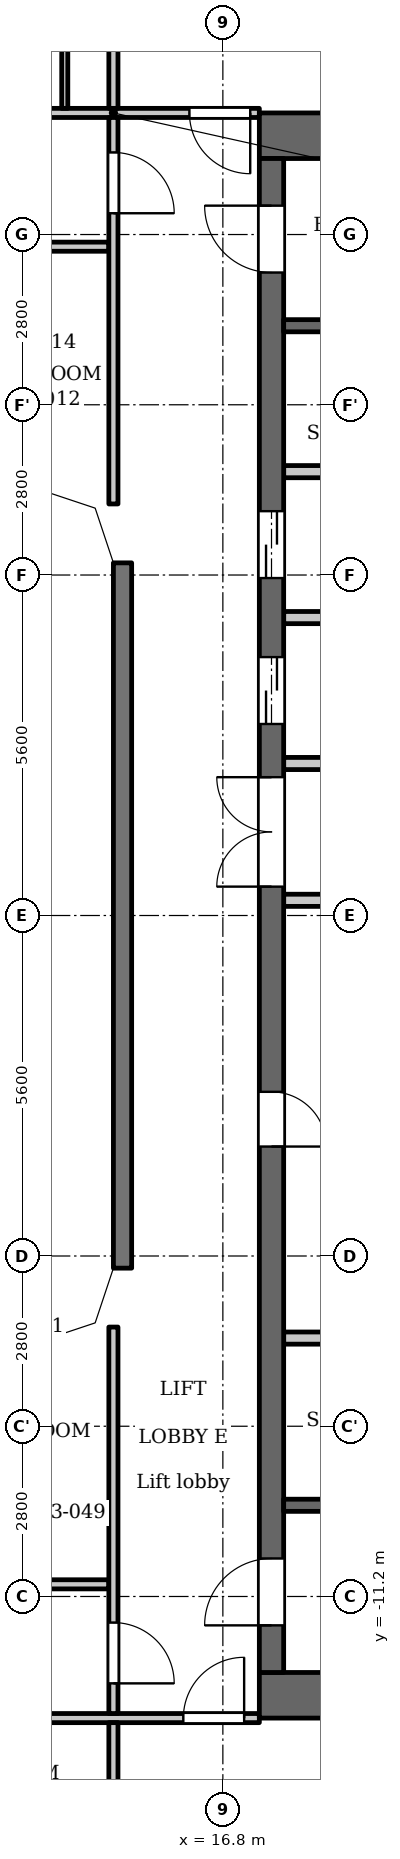
"""IFC4 building model, lengths in metres.
Left out: names, types, materials, properties, quantities, classifications, styles, units other than length and angle.
Written with IfcOpenShell. Run it as: python <this file> out.ifc"""

import sys

from ifc_helpers import new_model, si_unit, direction, frame, frame_2d, origin, place, context, subcontext, project, spatial, polyline, rectangle, outline, extrude, element, fill, save


model = new_model("IFC4")
c1 = context("Model", 3, precision=1e-05, world=origin(), true_north=direction((0.0, 1.0)))
c2 = subcontext(c1, "Body", "Model", "MODEL_VIEW")
j1 = project(units=[si_unit("LENGTHUNIT", "METRE"), si_unit("PLANEANGLEUNIT", "RADIAN")], contexts=[c1])
p1 = place(None, origin())
s1 = spatial("IfcSite", under=j1, at=p1, CompositionType="ELEMENT")
p2 = place(p1, origin())
s2 = spatial("IfcBuilding", under=s1, at=p2, CompositionType="ELEMENT")
p3 = place(p2, frame((0.0, 0.0, 167.6)))
s3 = spatial("IfcBuildingStorey", under=s2, at=p3, CompositionType="ELEMENT", Elevation=167.6)
p4 = place(p3, frame((15.15, 5.8, 0.0), z_axis=(0.0, 0.0, 1.0), x_axis=(0.0, -1.0, 0.0)))
e1 = element("IfcWall", 1, at=p4, inside=s3, PredefinedType="SOLIDWALL", context=c2, shape_type="SweptSolid", body=[
    extrude(rectangle(XDim=11.6, YDim=0.3, at=frame_2d((5.8, 0.0))), origin(), (0.0, 0.0, 1.0), 3.2),
])
for number, where, z_axis, x_axis in (
    (2, (17.4, 12.825, 0.0), (0.0, 0.0, 1.0), (1.0, 0.0, 0.0)),
    (3, (17.4, -12.825, 0.0), (0.0, 0.0, 1.0), (1.0, 0.0, 0.0)),
):
    element("IfcWall", number, at=place(p3, frame(where, z_axis=z_axis, x_axis=x_axis)), inside=s3, PredefinedType="SHEAR", context=c2, shape_type="SweptSolid", body=[
        extrude(rectangle(XDim=10.4, YDim=0.75, at=frame_2d((5.2, 0.0))), origin(), (0.0, 0.0, 1.0), 3.2),
    ])
p5 = place(p3, frame((17.6, -12.45, 0.0), z_axis=(0.0, 0.0, 1.0), x_axis=(0.0, 1.0, 0.0)))
e4 = element("IfcWall", 4, at=p5, inside=s3, PredefinedType="SHEAR", context=c2, shape_type="SweptSolid", body=[
    extrude(rectangle(XDim=24.9, YDim=0.4, at=frame_2d((12.45, 0.0))), origin(), (0.0, 0.0, 1.0), 3.2),
])
p6 = place(p5, frame((8.65, 0.0, 0.0)))
e5 = element("IfcOpeningElement", 5, at=p6, cuts=e4, PredefinedType="OPENING", context=c2, shape_type="SweptSolid", body=[
    extrude(rectangle(XDim=0.9, YDim=2.1, at=frame_2d((0.45, 1.05))), frame((0.0, 0.21, 0.0), z_axis=(0.0, -1.0, 0.0), x_axis=(1.0, 0.0, 0.0)), (0.0, 0.0, 1.0), 0.42),
])
p7 = place(p5, frame((15.6, 0.0, 0.0)))
e6 = element("IfcOpeningElement", 6, at=p7, cuts=e4, PredefinedType="OPENING", context=c2, shape_type="SweptSolid", body=[
    extrude(rectangle(XDim=1.1, YDim=2.1, at=frame_2d((0.55, 1.05))), frame((0.0, 0.21, 0.0), z_axis=(0.0, -1.0, 0.0), x_axis=(1.0, 0.0, 0.0)), (0.0, 0.0, 1.0), 0.42),
])
p8 = place(p5, frame((18.0, 0.0, 0.0)))
e7 = element("IfcOpeningElement", 7, at=p8, cuts=e4, PredefinedType="OPENING", context=c2, shape_type="SweptSolid", body=[
    extrude(rectangle(XDim=1.1, YDim=2.1, at=frame_2d((0.55, 1.05))), frame((0.0, 0.21, 0.0), z_axis=(0.0, -1.0, 0.0), x_axis=(1.0, 0.0, 0.0)), (0.0, 0.0, 1.0), 0.42),
])
p9 = place(p5, frame((23.025, 0.0, 0.0)))
e8 = element("IfcOpeningElement", 8, at=p9, cuts=e4, PredefinedType="OPENING", context=c2, shape_type="SweptSolid", body=[
    extrude(rectangle(XDim=1.1, YDim=2.1, at=frame_2d((0.55, 1.05))), frame((0.0, 0.21, 0.0), z_axis=(0.0, -1.0, 0.0), x_axis=(1.0, 0.0, 0.0)), (0.0, 0.0, 1.0), 0.42),
])
p10 = place(p5, frame((0.775, 0.0, 0.0)))
e9 = element("IfcOpeningElement", 9, at=p10, cuts=e4, PredefinedType="OPENING", context=c2, shape_type="SweptSolid", body=[
    extrude(rectangle(XDim=1.1, YDim=2.1, at=frame_2d((0.55, 1.05))), frame((0.0, 0.21, 0.0), z_axis=(0.0, -1.0, 0.0), x_axis=(1.0, 0.0, 0.0)), (0.0, 0.0, 1.0), 0.42),
])
p11 = place(p5, frame((12.925, 0.0, 0.0)))
e10 = element("IfcOpeningElement", 10, at=p11, cuts=e4, PredefinedType="OPENING", context=c2, shape_type="SweptSolid", body=[
    extrude(rectangle(XDim=1.8, YDim=2.1, at=frame_2d((0.9, 1.05))), frame((0.0, 0.21, 0.0), z_axis=(0.0, -1.0, 0.0), x_axis=(1.0, 0.0, 0.0)), (0.0, 0.0, 1.0), 0.42),
])
p12 = place(p3, frame((17.8, -9.7, 0.0), z_axis=(0.0, 0.0, 1.0), x_axis=(1.0, 0.0, 0.0)))
e11 = element("IfcWall", 11, at=p12, inside=s3, PredefinedType="SHEAR", context=c2, shape_type="SweptSolid", body=[
    extrude(rectangle(XDim=8.45, YDim=0.2, at=frame_2d((4.225, 0.0))), origin(), (0.0, 0.0, 1.0), 3.2),
])
p13 = place(p12, frame((0.85, 0.0, 0.0)))
e12 = element("IfcOpeningElement", 12, at=p13, cuts=e11, PredefinedType="OPENING", context=c2, shape_type="SweptSolid", body=[
    extrude(rectangle(XDim=1.1, YDim=2.1, at=frame_2d((0.55, 1.05))), frame((0.0, 0.11, 0.0), z_axis=(0.0, -1.0, 0.0), x_axis=(1.0, 0.0, 0.0)), (0.0, 0.0, 1.0), 0.22),
])
p14 = place(p12, frame((3.75, 0.0, 0.0)))
e13 = element("IfcOpeningElement", 13, at=p14, cuts=e11, PredefinedType="OPENING", context=c2, shape_type="SweptSolid", body=[
    extrude(rectangle(XDim=1.1, YDim=2.1, at=frame_2d((0.55, 1.05))), frame((0.0, 0.11, 0.0), z_axis=(0.0, -1.0, 0.0), x_axis=(1.0, 0.0, 0.0)), (0.0, 0.0, 1.0), 0.22),
])
p15 = place(p3, frame((17.8, -6.95, 0.0), z_axis=(0.0, 0.0, 1.0), x_axis=(1.0, 0.0, 0.0)))
e14 = element("IfcWall", 14, at=p15, inside=s3, PredefinedType="PARTITIONING", context=c2, shape_type="SweptSolid", body=[
    extrude(rectangle(XDim=2.8, YDim=0.2, at=frame_2d((1.4, 0.0))), origin(), (0.0, 0.0, 1.0), 3.2),
])
p16 = place(p3, frame((17.8, 0.25, 0.0), z_axis=(0.0, 0.0, 1.0), x_axis=(1.0, 0.0, 0.0)))
e15 = element("IfcWall", 15, at=p16, inside=s3, PredefinedType="PARTITIONING", context=c2, shape_type="SweptSolid", body=[
    extrude(rectangle(XDim=3.0, YDim=0.2, at=frame_2d((1.5, 0.0))), origin(), (0.0, 0.0, 1.0), 3.2),
])
p17 = place(p16, frame((1.98, 0.0, 0.0)))
e16 = element("IfcOpeningElement", 16, at=p17, cuts=e15, PredefinedType="OPENING", context=c2, shape_type="SweptSolid", body=[
    extrude(rectangle(XDim=0.9, YDim=2.1, at=frame_2d((0.45, 1.05))), frame((0.0, 0.11, 0.0), z_axis=(0.0, -1.0, 0.0), x_axis=(1.0, 0.0, 0.0)), (0.0, 0.0, 1.0), 0.22),
])
p18 = place(p3, frame((17.8, 2.5, 0.0), z_axis=(0.0, 0.0, 1.0), x_axis=(1.0, 0.0, 0.0)))
e17 = element("IfcWall", 17, at=p18, inside=s3, PredefinedType="PARTITIONING", context=c2, shape_type="SweptSolid", body=[
    extrude(rectangle(XDim=3.0, YDim=0.2, at=frame_2d((1.5, 0.0))), origin(), (0.0, 0.0, 1.0), 3.2),
])
for number, where, z_axis, x_axis in (
    (18, (17.8, 4.9, 0.0), (0.0, 0.0, 1.0), (1.0, 0.0, 0.0)),
    (19, (17.8, 7.3, 0.0), (0.0, 0.0, 1.0), (1.0, 0.0, 0.0)),
):
    element("IfcWall", number, at=place(p3, frame(where, z_axis=z_axis, x_axis=x_axis)), inside=s3, PredefinedType="PARTITIONING", context=c2, shape_type="SweptSolid", body=[
        extrude(rectangle(XDim=2.8, YDim=0.2, at=frame_2d((1.4, 0.0))), origin(), (0.0, 0.0, 1.0), 3.2),
    ])
p19 = place(p3, frame((17.8, 9.7, 0.0), z_axis=(0.0, 0.0, 1.0), x_axis=(1.0, 0.0, 0.0)))
e20 = element("IfcWall", 20, at=p19, inside=s3, PredefinedType="SHEAR", context=c2, shape_type="SweptSolid", body=[
    extrude(rectangle(XDim=8.45, YDim=0.2, at=frame_2d((4.225, 0.0))), origin(), (0.0, 0.0, 1.0), 3.2),
])
p20 = place(p19, frame((0.85, 0.0, 0.0)))
e21 = element("IfcOpeningElement", 21, at=p20, cuts=e20, PredefinedType="OPENING", context=c2, shape_type="SweptSolid", body=[
    extrude(rectangle(XDim=1.1, YDim=2.1, at=frame_2d((0.55, 1.05))), frame((0.0, 0.11, 0.0), z_axis=(0.0, -1.0, 0.0), x_axis=(1.0, 0.0, 0.0)), (0.0, 0.0, 1.0), 0.22),
])
p21 = place(p19, frame((3.75, 0.0, 0.0)))
e22 = element("IfcOpeningElement", 22, at=p21, cuts=e20, PredefinedType="OPENING", context=c2, shape_type="SweptSolid", body=[
    extrude(rectangle(XDim=1.1, YDim=2.1, at=frame_2d((0.55, 1.05))), frame((0.0, 0.11, 0.0), z_axis=(0.0, -1.0, 0.0), x_axis=(1.0, 0.0, 0.0)), (0.0, 0.0, 1.0), 0.22),
])
p22 = place(p3, frame((-17.4, -13.2, 0.0), z_axis=(0.0, 0.0, 1.0), x_axis=(1.0, 0.0, 0.0)))
e23 = element("IfcWall", 23, at=p22, inside=s3, PredefinedType="PARTITIONING", context=c2, shape_type="SweptSolid", body=[
    extrude(rectangle(XDim=34.8, YDim=0.15, at=frame_2d((17.4, 0.0))), origin(), (0.0, 0.0, 1.0), 3.2),
])
p23 = place(p22, frame((0.15, 0.0, 0.0)))
e24 = element("IfcOpeningElement", 24, at=p23, cuts=e23, PredefinedType="OPENING", context=c2, shape_type="SweptSolid", body=[
    extrude(rectangle(XDim=1.0, YDim=2.1, at=frame_2d((0.5, 1.05))), frame((0.0, 0.085, 0.0), z_axis=(0.0, -1.0, 0.0), x_axis=(1.0, 0.0, 0.0)), (0.0, 0.0, 1.0), 0.17),
])
p24 = place(p22, frame((33.55, 0.0, 0.0)))
e25 = element("IfcOpeningElement", 25, at=p24, cuts=e23, PredefinedType="OPENING", context=c2, shape_type="SweptSolid", body=[
    extrude(rectangle(XDim=1.0, YDim=2.1, at=frame_2d((0.5, 1.05))), frame((0.0, 0.085, 0.0), z_axis=(0.0, -1.0, 0.0), x_axis=(1.0, 0.0, 0.0)), (0.0, 0.0, 1.0), 0.17),
])
p25 = place(p22, frame((15.7, 0.0, 0.0)))
e26 = element("IfcOpeningElement", 26, at=p25, cuts=e23, PredefinedType="OPENING", context=c2, shape_type="SweptSolid", body=[
    extrude(rectangle(XDim=1.0, YDim=2.1, at=frame_2d((0.5, 1.05))), frame((0.0, 0.085, 0.0), z_axis=(0.0, -1.0, 0.0), x_axis=(1.0, 0.0, 0.0)), (0.0, 0.0, 1.0), 0.17),
])
p26 = place(p22, frame((26.9, 0.0, 0.0)))
e27 = element("IfcOpeningElement", 27, at=p26, cuts=e23, PredefinedType="OPENING", context=c2, shape_type="SweptSolid", body=[
    extrude(rectangle(XDim=1.0, YDim=2.1, at=frame_2d((0.5, 1.05))), frame((0.0, 0.085, 0.0), z_axis=(0.0, -1.0, 0.0), x_axis=(1.0, 0.0, 0.0)), (0.0, 0.0, 1.0), 0.17),
])
p27 = place(p3, frame((-14.925, -11.0, 0.0), z_axis=(0.0, 0.0, 1.0), x_axis=(1.0, 0.0, 0.0)))
e28 = element("IfcWall", 28, at=p27, inside=s3, PredefinedType="PARTITIONING", context=c2, shape_type="SweptSolid", body=[
    extrude(rectangle(XDim=29.85, YDim=0.15, at=frame_2d((14.925, 0.0))), origin(), (0.0, 0.0, 1.0), 3.2),
])
p28 = place(p27, frame((9.875, 0.0, 0.0)))
e29 = element("IfcOpeningElement", 29, at=p28, cuts=e28, PredefinedType="OPENING", context=c2, shape_type="SweptSolid", body=[
    extrude(rectangle(XDim=1.0, YDim=2.1, at=frame_2d((0.5, 1.05))), frame((0.0, 0.085, 0.0), z_axis=(0.0, -1.0, 0.0), x_axis=(1.0, 0.0, 0.0)), (0.0, 0.0, 1.0), 0.17),
])
p29 = place(p27, frame((17.875, 0.0, 0.0)))
e30 = element("IfcOpeningElement", 30, at=p29, cuts=e28, PredefinedType="OPENING", context=c2, shape_type="SweptSolid", body=[
    extrude(rectangle(XDim=1.0, YDim=2.1, at=frame_2d((0.5, 1.05))), frame((0.0, 0.085, 0.0), z_axis=(0.0, -1.0, 0.0), x_axis=(1.0, 0.0, 0.0)), (0.0, 0.0, 1.0), 0.17),
])
p30 = place(p3, frame((-14.925, 11.0, 0.0), z_axis=(0.0, 0.0, 1.0), x_axis=(1.0, 0.0, 0.0)))
e31 = element("IfcWall", 31, at=p30, inside=s3, PredefinedType="PARTITIONING", context=c2, shape_type="SweptSolid", body=[
    extrude(rectangle(XDim=29.85, YDim=0.15, at=frame_2d((14.925, 0.0))), origin(), (0.0, 0.0, 1.0), 3.2),
])
p31 = place(p30, frame((2.475, 0.0, 0.0)))
e32 = element("IfcOpeningElement", 32, at=p31, cuts=e31, PredefinedType="OPENING", context=c2, shape_type="SweptSolid", body=[
    extrude(rectangle(XDim=1.0, YDim=2.1, at=frame_2d((0.5, 1.05))), frame((0.0, 0.085, 0.0), z_axis=(0.0, -1.0, 0.0), x_axis=(1.0, 0.0, 0.0)), (0.0, 0.0, 1.0), 0.17),
])
p32 = place(p30, frame((26.275, 0.0, 0.0)))
e33 = element("IfcOpeningElement", 33, at=p32, cuts=e31, PredefinedType="OPENING", context=c2, shape_type="SweptSolid", body=[
    extrude(rectangle(XDim=1.0, YDim=2.1, at=frame_2d((0.5, 1.05))), frame((0.0, 0.085, 0.0), z_axis=(0.0, -1.0, 0.0), x_axis=(1.0, 0.0, 0.0)), (0.0, 0.0, 1.0), 0.17),
])
p33 = place(p3, frame((-17.4, 13.2, 0.0), z_axis=(0.0, 0.0, 1.0), x_axis=(1.0, 0.0, 0.0)))
e34 = element("IfcWall", 34, at=p33, inside=s3, PredefinedType="PARTITIONING", context=c2, shape_type="SweptSolid", body=[
    extrude(rectangle(XDim=34.8, YDim=0.15, at=frame_2d((17.4, 0.0))), origin(), (0.0, 0.0, 1.0), 3.2),
])
p34 = place(p33, frame((0.25, 0.0, 0.0)))
e35 = element("IfcOpeningElement", 35, at=p34, cuts=e34, PredefinedType="OPENING", context=c2, shape_type="SweptSolid", body=[
    extrude(rectangle(XDim=1.0, YDim=2.1, at=frame_2d((0.5, 1.05))), frame((0.0, 0.085, 0.0), z_axis=(0.0, -1.0, 0.0), x_axis=(1.0, 0.0, 0.0)), (0.0, 0.0, 1.0), 0.17),
])
p35 = place(p33, frame((33.65, 0.0, 0.0)))
e36 = element("IfcOpeningElement", 36, at=p35, cuts=e34, PredefinedType="OPENING", context=c2, shape_type="SweptSolid", body=[
    extrude(rectangle(XDim=1.0, YDim=2.1, at=frame_2d((0.5, 1.05))), frame((0.0, 0.085, 0.0), z_axis=(0.0, -1.0, 0.0), x_axis=(1.0, 0.0, 0.0)), (0.0, 0.0, 1.0), 0.17),
])
p36 = place(p33, frame((10.15, 0.0, 0.0)))
e37 = element("IfcOpeningElement", 37, at=p36, cuts=e34, PredefinedType="OPENING", context=c2, shape_type="SweptSolid", body=[
    extrude(rectangle(XDim=1.0, YDim=2.1, at=frame_2d((0.5, 1.05))), frame((0.0, 0.085, 0.0), z_axis=(0.0, -1.0, 0.0), x_axis=(1.0, 0.0, 0.0)), (0.0, 0.0, 1.0), 0.17),
])
p37 = place(p33, frame((15.75, 0.0, 0.0)))
e38 = element("IfcOpeningElement", 38, at=p37, cuts=e34, PredefinedType="OPENING", context=c2, shape_type="SweptSolid", body=[
    extrude(rectangle(XDim=1.0, YDim=2.1, at=frame_2d((0.5, 1.05))), frame((0.0, 0.085, 0.0), z_axis=(0.0, -1.0, 0.0), x_axis=(1.0, 0.0, 0.0)), (0.0, 0.0, 1.0), 0.17),
])
p38 = place(p33, frame((24.95, 0.0, 0.0)))
e39 = element("IfcOpeningElement", 39, at=p38, cuts=e34, PredefinedType="OPENING", context=c2, shape_type="SweptSolid", body=[
    extrude(rectangle(XDim=1.0, YDim=2.1, at=frame_2d((0.5, 1.05))), frame((0.0, 0.085, 0.0), z_axis=(0.0, -1.0, 0.0), x_axis=(1.0, 0.0, 0.0)), (0.0, 0.0, 1.0), 0.17),
])
p39 = place(p33, frame((29.95, 0.0, 0.0)))
e40 = element("IfcOpeningElement", 40, at=p39, cuts=e34, PredefinedType="OPENING", context=c2, shape_type="SweptSolid", body=[
    extrude(rectangle(XDim=1.0, YDim=2.1, at=frame_2d((0.5, 1.05))), frame((0.0, 0.085, 0.0), z_axis=(0.0, -1.0, 0.0), x_axis=(1.0, 0.0, 0.0)), (0.0, 0.0, 1.0), 0.17),
])
p40 = place(p3, frame((14.2, 13.275, 0.0), z_axis=(0.0, 0.0, 1.0), x_axis=(0.0, 1.0, 0.0)))
e41 = element("IfcWall", 41, at=p40, inside=s3, PredefinedType="PARTITIONING", context=c2, shape_type="SweptSolid", body=[
    extrude(rectangle(XDim=3.175, YDim=0.1, at=frame_2d((1.587, 0.0))), origin(), (0.0, 0.0, 1.0), 3.2),
])
p41 = place(p3, frame((15.0, -15.325, 0.0), z_axis=(0.0, 0.0, 1.0), x_axis=(0.0, 1.0, 0.0)))
e42 = element("IfcWall", 42, at=p41, inside=s3, PredefinedType="PARTITIONING", context=c2, shape_type="SweptSolid", body=[
    extrude(rectangle(XDim=2.05, YDim=0.15, at=frame_2d((1.025, 0.0))), origin(), (0.0, 0.0, 1.0), 3.2),
])
p42 = place(p3, frame((15.0, -13.125, 0.0), z_axis=(0.0, 0.0, 1.0), x_axis=(0.0, 1.0, 0.0)))
e43 = element("IfcWall", 43, at=p42, inside=s3, PredefinedType="PARTITIONING", context=c2, shape_type="SweptSolid", body=[
    extrude(rectangle(XDim=6.356, YDim=0.15, at=frame_2d((3.178, 0.0))), origin(), (0.0, 0.0, 1.0), 3.2),
])
p43 = place(p42, frame((0.496, 0.0, 0.0)))
e44 = element("IfcOpeningElement", 44, at=p43, cuts=e43, PredefinedType="OPENING", context=c2, shape_type="SweptSolid", body=[
    extrude(rectangle(XDim=1.0, YDim=2.1, at=frame_2d((0.5, 1.05))), frame((0.0, 0.085, 0.0), z_axis=(0.0, -1.0, 0.0), x_axis=(1.0, 0.0, 0.0)), (0.0, 0.0, 1.0), 0.17),
])
p44 = place(p3, frame((15.0, 6.769, 0.0), z_axis=(0.0, 0.0, 1.0), x_axis=(0.0, 1.0, 0.0)))
e45 = element("IfcWall", 45, at=p44, inside=s3, PredefinedType="PARTITIONING", context=c2, shape_type="SweptSolid", body=[
    extrude(rectangle(XDim=6.356, YDim=0.15, at=frame_2d((3.178, 0.0))), origin(), (0.0, 0.0, 1.0), 3.2),
])
p45 = place(p44, frame((4.781, 0.0, 0.0)))
e46 = element("IfcOpeningElement", 46, at=p45, cuts=e45, PredefinedType="OPENING", context=c2, shape_type="SweptSolid", body=[
    extrude(rectangle(XDim=1.0, YDim=2.1, at=frame_2d((0.5, 1.05))), frame((0.0, 0.085, 0.0), z_axis=(0.0, -1.0, 0.0), x_axis=(1.0, 0.0, 0.0)), (0.0, 0.0, 1.0), 0.17),
])
p46 = place(p3, frame((15.0, 13.275, 0.0), z_axis=(0.0, 0.0, 1.0), x_axis=(0.0, 1.0, 0.0)))
e47 = element("IfcWall", 47, at=p46, inside=s3, PredefinedType="PARTITIONING", context=c2, shape_type="SweptSolid", body=[
    extrude(rectangle(XDim=2.05, YDim=0.15, at=frame_2d((1.025, 0.0))), origin(), (0.0, 0.0, 1.0), 3.2),
])
p47 = place(p3, origin())
e48 = element("IfcWall", 48, at=p47, inside=s3, PredefinedType="SOLIDWALL", context=c2, shape_type="SweptSolid", body=[
    extrude(outline(polyline([(14.937, 6.937), (13.849, 7.3), (13.8, 7.3), (13.8, 7.0), (14.7, 6.7), (15.0, 5.8), (15.3, 5.8), (15.3, 5.849), (14.937, 6.937)])), origin(), (0.0, 0.0, 1.0), 3.2),
])
e49 = element("IfcWall", 49, at=p47, inside=s3, PredefinedType="SOLIDWALL", context=c2, shape_type="SweptSolid", body=[
    extrude(outline(polyline([(14.937, -6.937), (15.3, -5.849), (15.3, -5.8), (15.0, -5.8), (14.7, -6.7), (13.8, -7.0), (13.8, -7.3), (13.849, -7.3), (14.937, -6.937)])), origin(), (0.0, 0.0, 1.0), 3.2),
])
p48 = place(p6, origin())
e50 = element("IfcDoor", 50, at=p48, inside=s3, OperationType="SINGLE_SWING_LEFT", PredefinedType="DOOR", context=c2, shape_type="SweptSolid", body=[
    extrude(rectangle(XDim=0.9, YDim=2.1, at=frame_2d((0.45, 1.05))), frame((0.0, 0.025, 0.0), z_axis=(0.0, -1.0, 0.0), x_axis=(1.0, 0.0, 0.0)), (0.0, 0.0, 1.0), 0.05),
])
fill(e5, e50)
p49 = place(p7, origin())
e51 = element("IfcDoor", 51, at=p49, inside=s3, OperationType="DOUBLE_DOOR_SLIDING", PredefinedType="DOOR", context=c2, shape_type="SweptSolid", body=[
    extrude(rectangle(XDim=1.1, YDim=2.1, at=frame_2d((0.55, 1.05))), frame((0.0, 0.025, 0.0), z_axis=(0.0, -1.0, 0.0), x_axis=(1.0, 0.0, 0.0)), (0.0, 0.0, 1.0), 0.05),
])
fill(e6, e51)
p50 = place(p8, origin())
e52 = element("IfcDoor", 52, at=p50, inside=s3, OperationType="DOUBLE_DOOR_SLIDING", PredefinedType="DOOR", context=c2, shape_type="SweptSolid", body=[
    extrude(rectangle(XDim=1.1, YDim=2.1, at=frame_2d((0.55, 1.05))), frame((0.0, 0.025, 0.0), z_axis=(0.0, -1.0, 0.0), x_axis=(1.0, 0.0, 0.0)), (0.0, 0.0, 1.0), 0.05),
])
fill(e7, e52)
p51 = place(p9, origin())
e53 = element("IfcDoor", 53, at=p51, inside=s3, OperationType="SINGLE_SWING_LEFT", PredefinedType="DOOR", context=c2, shape_type="SweptSolid", body=[
    extrude(rectangle(XDim=1.1, YDim=2.1, at=frame_2d((0.55, 1.05))), frame((0.0, 0.025, 0.0), z_axis=(0.0, -1.0, 0.0), x_axis=(1.0, 0.0, 0.0)), (0.0, 0.0, 1.0), 0.05),
])
fill(e8, e53)
p52 = place(p10, origin())
e54 = element("IfcDoor", 54, at=p52, inside=s3, OperationType="SINGLE_SWING_RIGHT", PredefinedType="DOOR", context=c2, shape_type="SweptSolid", body=[
    extrude(rectangle(XDim=1.1, YDim=2.1, at=frame_2d((0.55, 1.05))), frame((0.0, 0.025, 0.0), z_axis=(0.0, -1.0, 0.0), x_axis=(1.0, 0.0, 0.0)), (0.0, 0.0, 1.0), 0.05),
])
fill(e9, e54)
p53 = place(p11, origin())
e55 = element("IfcDoor", 55, at=p53, inside=s3, OperationType="DOUBLE_DOOR_SINGLE_SWING", PredefinedType="DOOR", context=c2, shape_type="SweptSolid", body=[
    extrude(rectangle(XDim=1.8, YDim=2.1, at=frame_2d((0.9, 1.05))), frame((0.0, 0.025, 0.0), z_axis=(0.0, -1.0, 0.0), x_axis=(1.0, 0.0, 0.0)), (0.0, 0.0, 1.0), 0.05),
])
fill(e10, e55)
p54 = place(p45, origin())
e56 = element("IfcDoor", 56, at=p54, inside=s3, OperationType="SINGLE_SWING_LEFT", PredefinedType="DOOR", context=c2, shape_type="SweptSolid", body=[
    extrude(rectangle(XDim=1.0, YDim=2.1, at=frame_2d((0.5, 1.05))), frame((0.0, 0.025, 0.0), z_axis=(0.0, -1.0, 0.0), x_axis=(1.0, 0.0, 0.0)), (0.0, 0.0, 1.0), 0.05),
])
fill(e46, e56)
p55 = place(p35, origin())
e57 = element("IfcDoor", 57, at=p55, inside=s3, OperationType="SINGLE_SWING_RIGHT", PredefinedType="DOOR", context=c2, shape_type="SweptSolid", body=[
    extrude(rectangle(XDim=1.0, YDim=2.1, at=frame_2d((0.5, 1.05))), frame((0.0, 0.025, 0.0), z_axis=(0.0, -1.0, 0.0), x_axis=(1.0, 0.0, 0.0)), (0.0, 0.0, 1.0), 0.05),
])
fill(e36, e57)
p56 = place(p43, origin())
e58 = element("IfcDoor", 58, at=p56, inside=s3, OperationType="SINGLE_SWING_LEFT", PredefinedType="DOOR", context=c2, shape_type="SweptSolid", body=[
    extrude(rectangle(XDim=1.0, YDim=2.1, at=frame_2d((0.5, 1.05))), frame((0.0, 0.025, 0.0), z_axis=(0.0, -1.0, 0.0), x_axis=(1.0, 0.0, 0.0)), (0.0, 0.0, 1.0), 0.05),
])
fill(e44, e58)
p57 = place(p24, origin())
e59 = element("IfcDoor", 59, at=p57, inside=s3, OperationType="SINGLE_SWING_LEFT", PredefinedType="DOOR", context=c2, shape_type="SweptSolid", body=[
    extrude(rectangle(XDim=1.0, YDim=2.1, at=frame_2d((0.5, 1.05))), frame((0.0, 0.025, 0.0), z_axis=(0.0, -1.0, 0.0), x_axis=(1.0, 0.0, 0.0)), (0.0, 0.0, 1.0), 0.05),
])
fill(e25, e59)
save(model, sys.argv[1])
